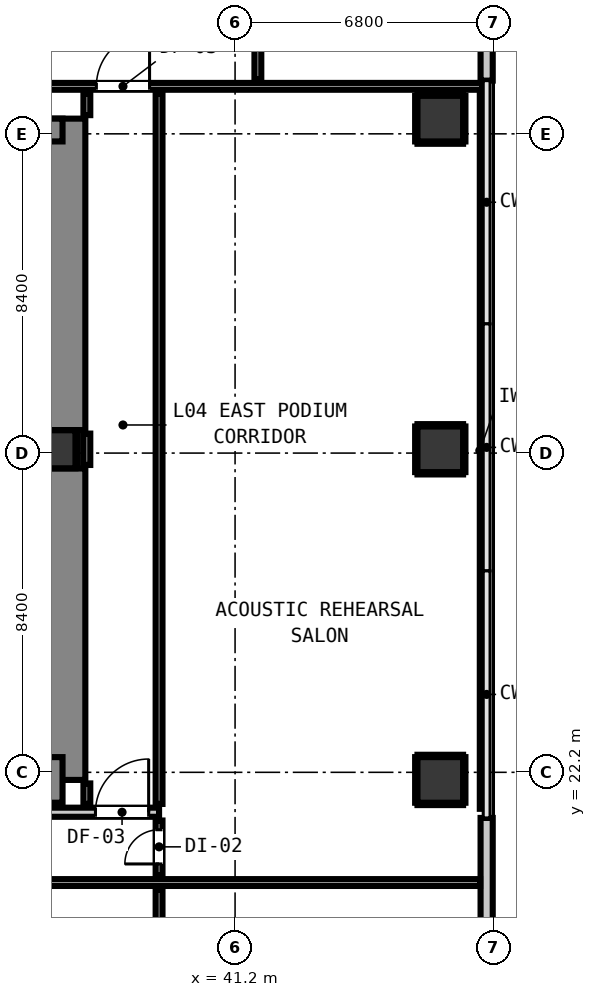
"""IFC4 building model, lengths in metres.
Left out: names, types, materials, properties, quantities, classifications, styles, units other than length and angle.
Written with IfcOpenShell. Run it as: python <this file> out.ifc"""

import sys

from ifc_helpers import new_model, si_unit, direction, frame, frame_2d, origin, origin_2d, place, context, subcontext, project, spatial, rectangle, circle, extrude, element, fill, save


model = new_model("IFC4")
c1 = context("Model", 3, precision=1e-05, world=origin(), true_north=direction((0.0, 1.0)))
c2 = subcontext(c1, "Body", "Model", "MODEL_VIEW")
j1 = project(units=[si_unit("LENGTHUNIT", "METRE"), si_unit("PLANEANGLEUNIT", "RADIAN")], contexts=[c1])
p1 = place(None, origin())
s1 = spatial("IfcSite", under=j1, at=p1, CompositionType="ELEMENT")
p2 = place(p1, origin())
s2 = spatial("IfcBuilding", under=s1, at=p2, CompositionType="ELEMENT")
p3 = place(p2, frame((0.0, 0.0, 17.8)))
s3 = spatial("IfcBuildingStorey", under=s2, at=p3, CompositionType="ELEMENT", Elevation=17.8)
p4 = place(p3, frame((36.5, 30.7, 0.0), z_axis=(0.0, 0.0, 1.0), x_axis=(1.0, 0.0, 0.0)))
e1 = element("IfcColumn", 1, at=p4, inside=s3, PredefinedType="COLUMN", context=c2, shape_type="SweptSolid", body=[
    extrude(rectangle(XDim=1.0, YDim=1.0, at=origin_2d()), origin(), (0.0, 0.0, 1.0), 4.2),
])
p5 = place(p3, frame((36.66, 22.0, 0.0), z_axis=(0.0, 0.0, 1.0), x_axis=(0.0, 1.0, 0.0)))
e2 = element("IfcWall", 2, at=p5, inside=s3, PredefinedType="SHEAR", context=c2, shape_type="SweptSolid", body=[
    extrude(rectangle(XDim=8.195, YDim=1.2, at=frame_2d((4.098, 0.0))), origin(), (0.0, 0.0, 1.0), 4.2),
])
p6 = place(p3, frame((36.66, 31.205, 0.0), z_axis=(0.0, 0.0, 1.0), x_axis=(0.0, 1.0, 0.0)))
e3 = element("IfcWall", 3, at=p6, inside=s3, PredefinedType="SHEAR", context=c2, shape_type="SweptSolid", body=[
    extrude(rectangle(XDim=8.195, YDim=1.2, at=frame_2d((4.097, 0.0))), origin(), (0.0, 0.0, 1.0), 4.2),
])
p7 = place(p3, frame((29.705, 22.0, 0.0), z_axis=(0.0, 0.0, 1.0), x_axis=(1.0, 0.0, 0.0)))
e4 = element("IfcWall", 4, at=p7, inside=s3, PredefinedType="SHEAR", context=c2, shape_type="SweptSolid", body=[
    extrude(rectangle(XDim=6.955, YDim=1.2, at=frame_2d((3.478, 0.0))), origin(), (0.0, 0.0, 1.0), 4.2),
])
p8 = place(p3, frame((32.58, 39.1, 0.0), z_axis=(0.0, 0.0, 1.0), x_axis=(1.0, 0.0, 0.0)))
e5 = element("IfcWall", 5, at=p8, inside=s3, PredefinedType="SHEAR", context=c2, shape_type="SweptSolid", body=[
    extrude(rectangle(XDim=4.08, YDim=0.6, at=frame_2d((2.04, 0.0))), origin(), (0.0, 0.0, 1.0), 4.2),
])
for number, where, z_axis, x_axis in (
    (6, (46.6, 22.0, 0.0), (0.0, 0.0, 1.0), (1.0, 0.0, 0.0)),
    (7, (46.6, 30.7, 0.0), (0.0, 0.0, 1.0), (1.0, 0.0, 0.0)),
    (8, (46.6, 39.4, 0.0), (0.0, 0.0, 1.0), (1.0, 0.0, 0.0)),
):
    element("IfcColumn", number, at=place(p3, frame(where, z_axis=z_axis, x_axis=x_axis)), inside=s3, PredefinedType="COLUMN", context=c2, shape_type="SweptSolid", body=[
        extrude(circle(Radius=0.6, at=origin_2d()), origin(), (0.0, 0.0, 1.0), 3.78),
    ])
p9 = place(p3, frame((47.82, 48.52, 0.0), z_axis=(0.0, 0.0, 1.0), x_axis=(0.0, -1.0, 0.0)))
e9 = element("IfcWall", 9, at=p9, inside=s3, PredefinedType="STANDARD", context=c2, shape_type="SweptSolid", body=[
    extrude(rectangle(XDim=8.12, YDim=0.32, at=frame_2d((4.06, 0.0))), origin(), (0.0, 0.0, 1.0), 3.78),
])
p10 = place(p3, frame((47.82, 21.0, 0.0), z_axis=(0.0, 0.0, 1.0), x_axis=(0.0, -1.0, 0.0)))
e10 = element("IfcWall", 10, at=p10, inside=s3, PredefinedType="STANDARD", context=c2, shape_type="SweptSolid", body=[
    extrude(rectangle(XDim=8.32, YDim=0.32, at=frame_2d((4.16, 0.0))), origin(), (0.0, 0.0, 1.0), 3.78),
])
p11 = place(p3, frame((10.5, 21.15, 0.0), z_axis=(0.0, 0.0, 1.0), x_axis=(1.0, 0.0, 0.0)))
e11 = element("IfcWall", 11, at=p11, inside=s3, PredefinedType="PARTITIONING", context=c2, shape_type="SweptSolid", body=[
    extrude(rectangle(XDim=28.7, YDim=0.24, at=frame_2d((14.35, 0.0))), origin(), (0.0, 0.0, 1.0), 3.78),
])
p12 = place(p11, frame((7.71, 0.0, 0.0)))
e12 = element("IfcOpeningElement", 12, at=p12, cuts=e11, PredefinedType="OPENING", context=c2, shape_type="SweptSolid", body=[
    extrude(rectangle(XDim=1.1, YDim=2.15, at=frame_2d((0.55, 1.075))), frame((0.0, 0.13, 0.0), z_axis=(0.0, -1.0, 0.0), x_axis=(1.0, 0.0, 0.0)), (0.0, 0.0, 1.0), 0.26),
])
p13 = place(p11, frame((0.324, 0.0, 0.0)))
e13 = element("IfcOpeningElement", 13, at=p13, cuts=e11, PredefinedType="OPENING", context=c2, shape_type="SweptSolid", body=[
    extrude(rectangle(XDim=1.4, YDim=2.15, at=frame_2d((0.7, 1.075))), frame((0.0, 0.13, 0.0), z_axis=(0.0, -1.0, 0.0), x_axis=(1.0, 0.0, 0.0)), (0.0, 0.0, 1.0), 0.26),
])
p14 = place(p11, frame((27.026, 0.0, 0.0)))
e14 = element("IfcOpeningElement", 14, at=p14, cuts=e11, PredefinedType="OPENING", context=c2, shape_type="SweptSolid", body=[
    extrude(rectangle(XDim=1.4, YDim=2.15, at=frame_2d((0.7, 1.075))), frame((0.0, 0.13, 0.0), z_axis=(0.0, -1.0, 0.0), x_axis=(1.0, 0.0, 0.0)), (0.0, 0.0, 1.0), 0.26),
])
p15 = place(p3, frame((4.352, 19.3, 0.0), z_axis=(0.0, 0.0, 1.0), x_axis=(1.0, 0.0, 0.0)))
e15 = element("IfcWall", 15, at=p15, inside=s3, PredefinedType="PARTITIONING", context=c2, shape_type="SweptSolid", body=[
    extrude(rectangle(XDim=43.296, YDim=0.18, at=frame_2d((21.648, 0.0))), origin(), (0.0, 0.0, 1.0), 3.78),
])
p16 = place(p15, frame((14.472, 0.0, 0.0)))
e16 = element("IfcOpeningElement", 16, at=p16, cuts=e15, PredefinedType="OPENING", context=c2, shape_type="SweptSolid", body=[
    extrude(rectangle(XDim=0.9, YDim=2.1, at=frame_2d((0.45, 1.05))), frame((0.0, 0.1, 0.0), z_axis=(0.0, -1.0, 0.0), x_axis=(1.0, 0.0, 0.0)), (0.0, 0.0, 1.0), 0.2),
])
p17 = place(p15, frame((28.774, 0.0, 0.0)))
e17 = element("IfcOpeningElement", 17, at=p17, cuts=e15, PredefinedType="OPENING", context=c2, shape_type="SweptSolid", body=[
    extrude(rectangle(XDim=0.9, YDim=2.1, at=frame_2d((0.45, 1.05))), frame((0.0, 0.1, 0.0), z_axis=(0.0, -1.0, 0.0), x_axis=(1.0, 0.0, 0.0)), (0.0, 0.0, 1.0), 0.2),
])
p18 = place(p3, frame((10.5, 40.25, 0.0), z_axis=(0.0, 0.0, 1.0), x_axis=(1.0, 0.0, 0.0)))
e18 = element("IfcWall", 18, at=p18, inside=s3, PredefinedType="PARTITIONING", context=c2, shape_type="SweptSolid", body=[
    extrude(rectangle(XDim=37.2, YDim=0.18, at=frame_2d((18.6, 0.0))), origin(), (0.0, 0.0, 1.0), 3.78),
])
p19 = place(p18, frame((6.935, 0.0, 0.0)))
e19 = element("IfcOpeningElement", 19, at=p19, cuts=e18, PredefinedType="OPENING", context=c2, shape_type="SweptSolid", body=[
    extrude(rectangle(XDim=1.4, YDim=2.15, at=frame_2d((0.7, 1.075))), frame((0.0, 0.1, 0.0), z_axis=(0.0, -1.0, 0.0), x_axis=(1.0, 0.0, 0.0)), (0.0, 0.0, 1.0), 0.2),
])
p20 = place(p18, frame((0.324, 0.0, 0.0)))
e20 = element("IfcOpeningElement", 20, at=p20, cuts=e18, PredefinedType="OPENING", context=c2, shape_type="SweptSolid", body=[
    extrude(rectangle(XDim=1.4, YDim=2.15, at=frame_2d((0.7, 1.075))), frame((0.0, 0.1, 0.0), z_axis=(0.0, -1.0, 0.0), x_axis=(1.0, 0.0, 0.0)), (0.0, 0.0, 1.0), 0.2),
])
p21 = place(p18, frame((27.05, 0.0, 0.0)))
e21 = element("IfcOpeningElement", 21, at=p21, cuts=e18, PredefinedType="OPENING", context=c2, shape_type="SweptSolid", body=[
    extrude(rectangle(XDim=1.4, YDim=2.15, at=frame_2d((0.7, 1.075))), frame((0.0, 0.1, 0.0), z_axis=(0.0, -1.0, 0.0), x_axis=(1.0, 0.0, 0.0)), (0.0, 0.0, 1.0), 0.2),
])
p22 = place(p3, frame((37.3, 21.368, 0.0), z_axis=(0.0, 0.0, 1.0), x_axis=(0.0, 1.0, 0.0)))
e22 = element("IfcWall", 22, at=p22, inside=s3, PredefinedType="PARTITIONING", context=c2, shape_type="SweptSolid", body=[
    extrude(rectangle(XDim=0.54, YDim=0.18, at=frame_2d((0.27, 0.0))), origin(), (0.0, 0.0, 1.0), 3.78),
])
p23 = place(p3, frame((37.3, 30.287, 0.0), z_axis=(0.0, 0.0, 1.0), x_axis=(0.0, 1.0, 0.0)))
e23 = element("IfcWall", 23, at=p23, inside=s3, PredefinedType="PARTITIONING", context=c2, shape_type="SweptSolid", body=[
    extrude(rectangle(XDim=0.826, YDim=0.18, at=frame_2d((0.413, 0.0))), origin(), (0.0, 0.0, 1.0), 3.78),
])
p24 = place(p3, frame((37.3, 39.492, 0.0), z_axis=(0.0, 0.0, 1.0), x_axis=(0.0, 1.0, 0.0)))
e24 = element("IfcWall", 24, at=p24, inside=s3, PredefinedType="PARTITIONING", context=c2, shape_type="SweptSolid", body=[
    extrude(rectangle(XDim=0.57, YDim=0.18, at=frame_2d((0.285, 0.0))), origin(), (0.0, 0.0, 1.0), 3.78),
])
p25 = place(p3, frame((39.2, 10.352, 0.0), z_axis=(0.0, 0.0, 1.0), x_axis=(0.0, 1.0, 0.0)))
e25 = element("IfcWall", 25, at=p25, inside=s3, PredefinedType="PARTITIONING", context=c2, shape_type="SweptSolid", body=[
    extrude(rectangle(XDim=8.76, YDim=0.18, at=frame_2d((4.38, 0.0))), origin(), (0.0, 0.0, 1.0), 3.78),
])
p26 = place(p3, frame((39.2, 19.488, 0.0), z_axis=(0.0, 0.0, 1.0), x_axis=(0.0, 1.0, 0.0)))
e26 = element("IfcWall", 26, at=p26, inside=s3, PredefinedType="PARTITIONING", context=c2, shape_type="SweptSolid", body=[
    extrude(rectangle(XDim=1.444, YDim=0.18, at=frame_2d((0.722, 0.0))), origin(), (0.0, 0.0, 1.0), 3.78),
])
p27 = place(p26, frame((0.301, 0.0, 0.0)))
e27 = element("IfcOpeningElement", 27, at=p27, cuts=e26, PredefinedType="OPENING", context=c2, shape_type="SweptSolid", body=[
    extrude(rectangle(XDim=0.9, YDim=2.1, at=frame_2d((0.45, 1.05))), frame((0.0, 0.1, 0.0), z_axis=(0.0, -1.0, 0.0), x_axis=(1.0, 0.0, 0.0)), (0.0, 0.0, 1.0), 0.2),
])
p28 = place(p3, frame((39.2, 21.368, 0.0), z_axis=(0.0, 0.0, 1.0), x_axis=(0.0, 1.0, 0.0)))
e28 = element("IfcWall", 28, at=p28, inside=s3, PredefinedType="PARTITIONING", context=c2, shape_type="SweptSolid", body=[
    extrude(rectangle(XDim=18.694, YDim=0.18, at=frame_2d((9.347, 0.0))), origin(), (0.0, 0.0, 1.0), 3.78),
])
p29 = place(p3, frame((41.8, 40.438, 0.0), z_axis=(0.0, 0.0, 1.0), x_axis=(0.0, 1.0, 0.0)))
e29 = element("IfcWall", 29, at=p29, inside=s3, PredefinedType="PARTITIONING", context=c2, shape_type="SweptSolid", body=[
    extrude(rectangle(XDim=1.474, YDim=0.18, at=frame_2d((0.737, 0.0))), origin(), (0.0, 0.0, 1.0), 3.78),
])
p30 = place(p3, frame((47.7, 21.24, 0.0), z_axis=(0.0, 0.0, 1.0), x_axis=(0.0, 1.0, 0.0)))
e30 = element("IfcWall", 30, at=p30, inside=s3, PredefinedType="PARTITIONING", context=c2, shape_type="SweptSolid", body=[
    extrude(rectangle(XDim=18.852, YDim=0.12, at=frame_2d((9.426, 0.0))), origin(), (0.0, 0.0, 1.0), 3.78),
])
p31 = place(p3, frame((37.032, 30.21, 0.0), z_axis=(0.0, 0.0, 1.0), x_axis=(0.0, 1.0, 0.0)))
e31 = element("IfcWall", 31, at=p31, inside=s3, PredefinedType="PARTITIONING", context=c2, shape_type="SweptSolid", body=[
    extrude(rectangle(XDim=0.98, YDim=0.06, at=frame_2d((0.49, 0.0))), origin(), (0.0, 0.0, 1.0), 1.45),
])
for number, where, z_axis, x_axis in (
    (32, (46.0, 21.368, 0.0), (0.0, 0.0, 1.0), (1.0, 0.0, 0.0)),
    (33, (46.0, 22.632, 0.0), (0.0, 0.0, 1.0), (1.0, 0.0, 0.0)),
):
    element("IfcWall", number, at=place(p3, frame(where, z_axis=z_axis, x_axis=x_axis)), inside=s3, PredefinedType="PARTITIONING", context=c2, shape_type="SweptSolid", body=[
        extrude(rectangle(XDim=1.2, YDim=0.06, at=frame_2d((0.6, 0.0))), origin(), (0.0, 0.0, 1.0), 1.45),
    ])
for number, where, z_axis, x_axis in (
    (34, (45.968, 21.4, 0.0), (0.0, 0.0, 1.0), (0.0, 1.0, 0.0)),
    (35, (47.232, 21.4, 0.0), (0.0, 0.0, 1.0), (0.0, 1.0, 0.0)),
):
    element("IfcWall", number, at=place(p3, frame(where, z_axis=z_axis, x_axis=x_axis)), inside=s3, PredefinedType="PARTITIONING", context=c2, shape_type="SweptSolid", body=[
        extrude(rectangle(XDim=1.2, YDim=0.06, at=frame_2d((0.6, 0.0))), origin(), (0.0, 0.0, 1.0), 1.45),
    ])
for number, where, z_axis, x_axis in (
    (36, (46.0, 30.068, 0.0), (0.0, 0.0, 1.0), (1.0, 0.0, 0.0)),
    (37, (46.0, 31.332, 0.0), (0.0, 0.0, 1.0), (1.0, 0.0, 0.0)),
    (38, (45.968, 30.1, 0.0), (0.0, 0.0, 1.0), (0.0, 1.0, 0.0)),
    (39, (47.232, 30.1, 0.0), (0.0, 0.0, 1.0), (0.0, 1.0, 0.0)),
    (40, (46.0, 38.768, 0.0), (0.0, 0.0, 1.0), (1.0, 0.0, 0.0)),
    (41, (46.0, 40.032, 0.0), (0.0, 0.0, 1.0), (1.0, 0.0, 0.0)),
    (42, (45.968, 38.8, 0.0), (0.0, 0.0, 1.0), (0.0, 1.0, 0.0)),
    (43, (47.232, 38.8, 0.0), (0.0, 0.0, 1.0), (0.0, 1.0, 0.0)),
):
    element("IfcWall", number, at=place(p3, frame(where, z_axis=z_axis, x_axis=x_axis)), inside=s3, PredefinedType="PARTITIONING", context=c2, shape_type="SweptSolid", body=[
        extrude(rectangle(XDim=1.2, YDim=0.06, at=frame_2d((0.6, 0.0))), origin(), (0.0, 0.0, 1.0), 1.45),
    ])
p32 = place(p14, origin())
e44 = element("IfcDoor", 44, at=p32, inside=s3, OperationType="SINGLE_SWING_RIGHT", PredefinedType="DOOR", context=c2, shape_type="SweptSolid", body=[
    extrude(rectangle(XDim=1.4, YDim=2.15, at=frame_2d((0.7, 1.075))), frame((0.0, 0.025, 0.0), z_axis=(0.0, -1.0, 0.0), x_axis=(1.0, 0.0, 0.0)), (0.0, 0.0, 1.0), 0.05),
])
fill(e14, e44)
p33 = place(p21, origin())
e45 = element("IfcDoor", 45, at=p33, inside=s3, OperationType="SINGLE_SWING_RIGHT", PredefinedType="DOOR", context=c2, shape_type="SweptSolid", body=[
    extrude(rectangle(XDim=1.4, YDim=2.15, at=frame_2d((0.7, 1.075))), frame((0.0, 0.025, 0.0), z_axis=(0.0, -1.0, 0.0), x_axis=(1.0, 0.0, 0.0)), (0.0, 0.0, 1.0), 0.05),
])
fill(e21, e45)
p34 = place(p27, origin())
e46 = element("IfcDoor", 46, at=p34, inside=s3, OperationType="SINGLE_SWING_LEFT", PredefinedType="DOOR", context=c2, shape_type="SweptSolid", body=[
    extrude(rectangle(XDim=0.9, YDim=2.1, at=frame_2d((0.45, 1.05))), frame((0.0, 0.025, 0.0), z_axis=(0.0, -1.0, 0.0), x_axis=(1.0, 0.0, 0.0)), (0.0, 0.0, 1.0), 0.05),
])
fill(e27, e46)
save(model, sys.argv[1])
